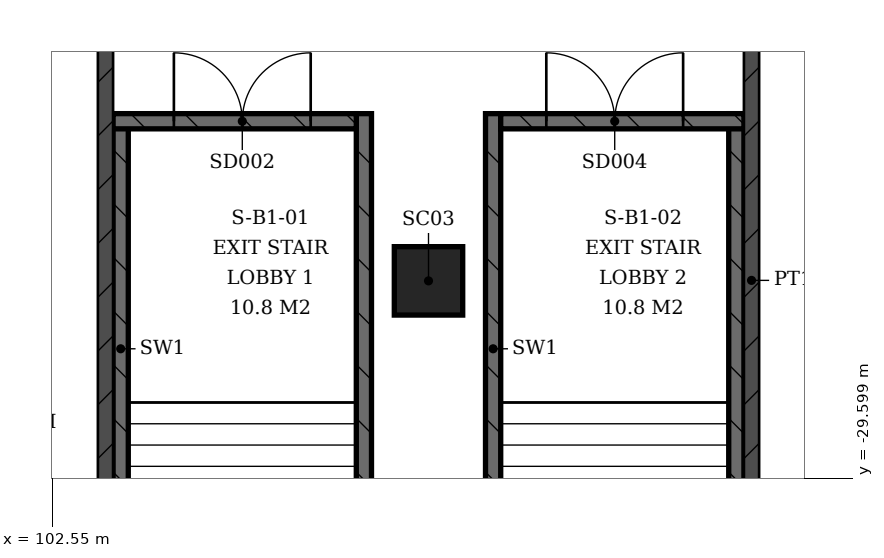
"""IFC4 building model, lengths in metres.
Left out: names, types, materials, properties, quantities, classifications, styles, units other than length and angle.
Written with IfcOpenShell. Run it as: python <this file> out.ifc"""

import sys

from ifc_helpers import new_model, si_unit, direction, frame, frame_2d, origin, origin_2d, place, context, subcontext, project, spatial, rectangle, extrude, element, fill, save


model = new_model("IFC4")
c1 = context("Model", 3, precision=1e-05, world=origin(), true_north=direction((0.0, 1.0)))
c2 = subcontext(c1, "Body", "Model", "MODEL_VIEW")
j1 = project(units=[si_unit("LENGTHUNIT", "METRE"), si_unit("PLANEANGLEUNIT", "RADIAN")], contexts=[c1])
p1 = place(None, origin())
s1 = spatial("IfcSite", under=j1, at=p1, CompositionType="ELEMENT")
p2 = place(p1, origin())
s2 = spatial("IfcBuilding", under=s1, at=p2, CompositionType="ELEMENT")
p3 = place(p2, frame((0.0, 0.0, -4.5)))
s3 = spatial("IfcBuildingStorey", under=s2, at=p3, CompositionType="ELEMENT", Elevation=-4.5)
for number, where, z_axis, x_axis in (
    (1, (103.45, -44.8, 0.0), (0.0, 0.0, 1.0), (0.0, 1.0, 0.0)),
    (2, (106.65, -44.8, 0.0), (0.0, 0.0, 1.0), (0.0, 1.0, 0.0)),
):
    element("IfcWall", number, at=place(p3, frame(where, z_axis=z_axis, x_axis=x_axis)), inside=s3, PredefinedType="SHEAR", context=c2, shape_type="SweptSolid", body=[
        extrude(rectangle(XDim=20.0, YDim=0.2, at=frame_2d((10.0, 0.0))), origin(), (0.0, 0.0, 1.0), 3.5),
    ])
p4 = place(p3, frame((103.35, -24.9, 0.0), z_axis=(0.0, 0.0, 1.0), x_axis=(1.0, 0.0, 0.0)))
e3 = element("IfcWall", 3, at=p4, inside=s3, PredefinedType="SHEAR", context=c2, shape_type="SweptSolid", body=[
    extrude(rectangle(XDim=3.2, YDim=0.2, at=frame_2d((1.6, 0.0))), origin(), (0.0, 0.0, 1.0), 3.5),
])
p5 = place(p4, frame((0.8, 0.0, 0.0)))
e4 = element("IfcOpeningElement", 4, at=p5, cuts=e3, PredefinedType="OPENING", context=c2, shape_type="SweptSolid", body=[
    extrude(rectangle(XDim=1.8, YDim=2.1, at=frame_2d((0.9, 1.05))), frame((0.0, 0.1, 0.0), z_axis=(0.0, -1.0, 0.0), x_axis=(1.0, 0.0, 0.0)), (0.0, 0.0, 1.0), 0.2),
])
for number, where, z_axis, x_axis in (
    (5, (108.35, -44.8, 0.0), (0.0, 0.0, 1.0), (0.0, 1.0, 0.0)),
    (6, (111.55, -44.8, 0.0), (0.0, 0.0, 1.0), (0.0, 1.0, 0.0)),
):
    element("IfcWall", number, at=place(p3, frame(where, z_axis=z_axis, x_axis=x_axis)), inside=s3, PredefinedType="SHEAR", context=c2, shape_type="SweptSolid", body=[
        extrude(rectangle(XDim=20.0, YDim=0.2, at=frame_2d((10.0, 0.0))), origin(), (0.0, 0.0, 1.0), 3.5),
    ])
p6 = place(p3, frame((108.45, -24.9, 0.0), z_axis=(0.0, 0.0, 1.0), x_axis=(1.0, 0.0, 0.0)))
e7 = element("IfcWall", 7, at=p6, inside=s3, PredefinedType="SHEAR", context=c2, shape_type="SweptSolid", body=[
    extrude(rectangle(XDim=3.2, YDim=0.2, at=frame_2d((1.6, 0.0))), origin(), (0.0, 0.0, 1.0), 3.5),
])
p7 = place(p6, frame((0.6, 0.0, 0.0)))
e8 = element("IfcOpeningElement", 8, at=p7, cuts=e7, PredefinedType="OPENING", context=c2, shape_type="SweptSolid", body=[
    extrude(rectangle(XDim=1.8, YDim=2.1, at=frame_2d((0.9, 1.05))), frame((0.0, 0.1, 0.0), z_axis=(0.0, -1.0, 0.0), x_axis=(1.0, 0.0, 0.0)), (0.0, 0.0, 1.0), 0.2),
])
p8 = place(p3, frame((107.5, -27.0, 0.0), z_axis=(0.0, 0.0, 1.0), x_axis=(1.0, 0.0, 0.0)))
e9 = element("IfcColumn", 9, at=p8, inside=s3, PredefinedType="COLUMN", context=c2, shape_type="SweptSolid", body=[
    extrude(rectangle(XDim=0.9, YDim=0.9, at=origin_2d()), origin(), (0.0, 0.0, 1.0), 3.5),
])
for number, where, z_axis, x_axis in (
    (10, (103.25, -49.1, 0.0), (0.0, 0.0, 1.0), (0.0, 1.0, 0.0)),
    (11, (111.75, -49.1, 0.0), (0.0, 0.0, 1.0), (0.0, 1.0, 0.0)),
):
    element("IfcWall", number, at=place(p3, frame(where, z_axis=z_axis, x_axis=x_axis)), inside=s3, PredefinedType="PARTITIONING", context=c2, shape_type="SweptSolid", body=[
        extrude(rectangle(XDim=26.1, YDim=0.2, at=frame_2d((13.05, 0.0))), origin(), (0.0, 0.0, 1.0), 3.5),
    ])
p9 = place(p5, origin())
e12 = element("IfcDoor", 12, at=p9, inside=s3, OperationType="DOUBLE_DOOR_SINGLE_SWING", PredefinedType="DOOR", context=c2, shape_type="SweptSolid", body=[
    extrude(rectangle(XDim=1.8, YDim=2.1, at=frame_2d((0.9, 1.05))), frame((0.0, 0.025, 0.0), z_axis=(0.0, -1.0, 0.0), x_axis=(1.0, 0.0, 0.0)), (0.0, 0.0, 1.0), 0.05),
])
fill(e4, e12)
p10 = place(p7, origin())
e13 = element("IfcDoor", 13, at=p10, inside=s3, OperationType="DOUBLE_DOOR_SINGLE_SWING", PredefinedType="DOOR", context=c2, shape_type="SweptSolid", body=[
    extrude(rectangle(XDim=1.8, YDim=2.1, at=frame_2d((0.9, 1.05))), frame((0.0, 0.025, 0.0), z_axis=(0.0, -1.0, 0.0), x_axis=(1.0, 0.0, 0.0)), (0.0, 0.0, 1.0), 0.05),
])
fill(e8, e13)
save(model, sys.argv[1])
